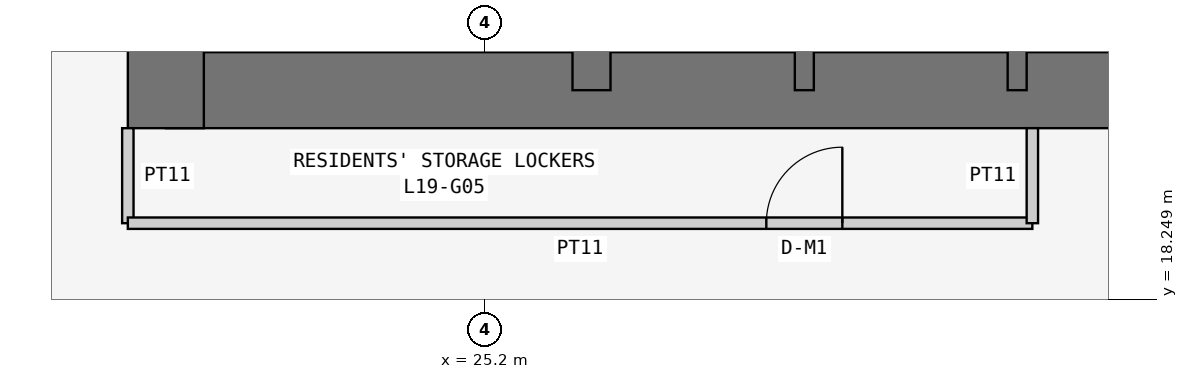
"""IFC4 building model, lengths in metres.
Left out: names, types, materials, properties, quantities, classifications, styles, units other than length and angle.
Written with IfcOpenShell. Run it as: python <this file> out.ifc"""

import sys

from ifc_helpers import new_model, si_unit, direction, frame, frame_2d, origin, place, context, subcontext, project, spatial, rectangle, extrude, element, fill, save


model = new_model("IFC4")
c1 = context("Model", 3, precision=1e-05, world=origin(), true_north=direction((0.0, 1.0)))
c2 = subcontext(c1, "Body", "Model", "MODEL_VIEW")
j1 = project(units=[si_unit("LENGTHUNIT", "METRE"), si_unit("PLANEANGLEUNIT", "RADIAN")], contexts=[c1])
p1 = place(None, origin())
s1 = spatial("IfcSite", under=j1, at=p1, CompositionType="ELEMENT")
p2 = place(p1, origin())
s2 = spatial("IfcBuilding", under=s1, at=p2, CompositionType="ELEMENT")
p3 = place(p2, frame((0.0, 0.0, 77.7)))
s3 = spatial("IfcBuildingStorey", under=s2, at=p3, CompositionType="ELEMENT", Elevation=77.7)
p4 = place(p3, frame((21.0, 21.0, 0.0), z_axis=(0.0, 0.0, 1.0), x_axis=(1.0, 0.0, 0.0)))
e1 = element("IfcWall", 1, at=p4, inside=s3, PredefinedType="SHEAR", context=c2, shape_type="SweptSolid", body=[
    extrude(rectangle(XDim=17.3, YDim=1.0, at=frame_2d((8.65, 0.0))), origin(), (0.0, 0.0, 1.0), 3.6),
])
p5 = place(p3, frame((21.0, 37.8, 0.0), z_axis=(0.0, 0.0, 1.0), x_axis=(0.0, -1.0, 0.0)))
e2 = element("IfcWall", 2, at=p5, inside=s3, PredefinedType="SHEAR", context=c2, shape_type="SweptSolid", body=[
    extrude(rectangle(XDim=17.3, YDim=1.0, at=frame_2d((8.65, 0.0))), origin(), (0.0, 0.0, 1.0), 3.6),
])
p6 = place(p5, frame((5.4, 0.0, 0.0)))
e3 = element("IfcOpeningElement", 3, at=p6, cuts=e2, PredefinedType="OPENING", context=c2, shape_type="SweptSolid", body=[
    extrude(rectangle(XDim=1.2, YDim=2.1, at=frame_2d((0.6, 1.05))), frame((0.0, 0.51, 0.0), z_axis=(0.0, -1.0, 0.0), x_axis=(1.0, 0.0, 0.0)), (0.0, 0.0, 1.0), 1.02),
])
p7 = place(p3, frame((26.6, 21.0, 0.0), z_axis=(0.0, 0.0, 1.0), x_axis=(0.0, 1.0, 0.0)))
e4 = element("IfcWall", 4, at=p7, inside=s3, PredefinedType="SHEAR", context=c2, shape_type="SweptSolid", body=[
    extrude(rectangle(XDim=16.8, YDim=0.5, at=frame_2d((8.4, 0.0))), origin(), (0.0, 0.0, 1.0), 3.6),
])
p8 = place(p7, frame((10.4, 0.0, 0.0)))
e5 = element("IfcOpeningElement", 5, at=p8, cuts=e4, PredefinedType="OPENING", context=c2, shape_type="SweptSolid", body=[
    extrude(rectangle(XDim=1.2, YDim=2.1, at=frame_2d((0.6, 1.05))), frame((0.0, 0.26, 0.0), z_axis=(0.0, -1.0, 0.0), x_axis=(1.0, 0.0, 0.0)), (0.0, 0.0, 1.0), 0.52),
])
for number, where, z_axis, x_axis in (
    (6, (29.4, 21.0, 0.0), (0.0, 0.0, 1.0), (0.0, 1.0, 0.0)),
    (7, (32.2, 21.0, 0.0), (0.0, 0.0, 1.0), (0.0, 1.0, 0.0)),
):
    element("IfcWall", number, at=place(p3, frame(where, z_axis=z_axis, x_axis=x_axis)), inside=s3, PredefinedType="SHEAR", context=c2, shape_type="SweptSolid", body=[
        extrude(rectangle(XDim=3.2, YDim=0.25, at=frame_2d((1.6, 0.0))), origin(), (0.0, 0.0, 1.0), 3.6),
    ])
p9 = place(p3, frame((20.5, 20.5, 0.0), z_axis=(0.0, 0.0, 1.0), x_axis=(0.0, -1.0, 0.0)))
e8 = element("IfcWall", 8, at=p9, inside=s3, PredefinedType="PARTITIONING", context=c2, shape_type="SweptSolid", body=[
    extrude(rectangle(XDim=1.25, YDim=0.15, at=frame_2d((0.625, 0.0))), origin(), (0.0, 0.0, 1.0), 3.45),
])
p10 = place(p3, frame((20.5, 19.25, 0.0), z_axis=(0.0, 0.0, 1.0), x_axis=(1.0, 0.0, 0.0)))
e9 = element("IfcWall", 9, at=p10, inside=s3, PredefinedType="PARTITIONING", context=c2, shape_type="SweptSolid", body=[
    extrude(rectangle(XDim=11.9, YDim=0.15, at=frame_2d((5.95, 0.0))), origin(), (0.0, 0.0, 1.0), 3.45),
])
p11 = place(p10, frame((8.4, 0.0, 0.0)))
e10 = element("IfcOpeningElement", 10, at=p11, cuts=e9, PredefinedType="OPENING", context=c2, shape_type="SweptSolid", body=[
    extrude(rectangle(XDim=1.0, YDim=2.1, at=frame_2d((0.5, 1.05))), frame((0.0, 0.085, 0.0), z_axis=(0.0, -1.0, 0.0), x_axis=(1.0, 0.0, 0.0)), (0.0, 0.0, 1.0), 0.17),
])
p12 = place(p3, frame((32.4, 19.25, 0.0), z_axis=(0.0, 0.0, 1.0), x_axis=(0.0, 1.0, 0.0)))
e11 = element("IfcWall", 11, at=p12, inside=s3, PredefinedType="PARTITIONING", context=c2, shape_type="SweptSolid", body=[
    extrude(rectangle(XDim=1.25, YDim=0.15, at=frame_2d((0.625, 0.0))), origin(), (0.0, 0.0, 1.0), 3.45),
])
p13 = place(p11, origin())
e12 = element("IfcDoor", 12, at=p13, inside=s3, OperationType="SINGLE_SWING_RIGHT", PredefinedType="DOOR", context=c2, shape_type="SweptSolid", body=[
    extrude(rectangle(XDim=1.0, YDim=2.1, at=frame_2d((0.5, 1.05))), frame((0.0, 0.025, 0.0), z_axis=(0.0, -1.0, 0.0), x_axis=(1.0, 0.0, 0.0)), (0.0, 0.0, 1.0), 0.05),
])
fill(e10, e12)
save(model, sys.argv[1])
